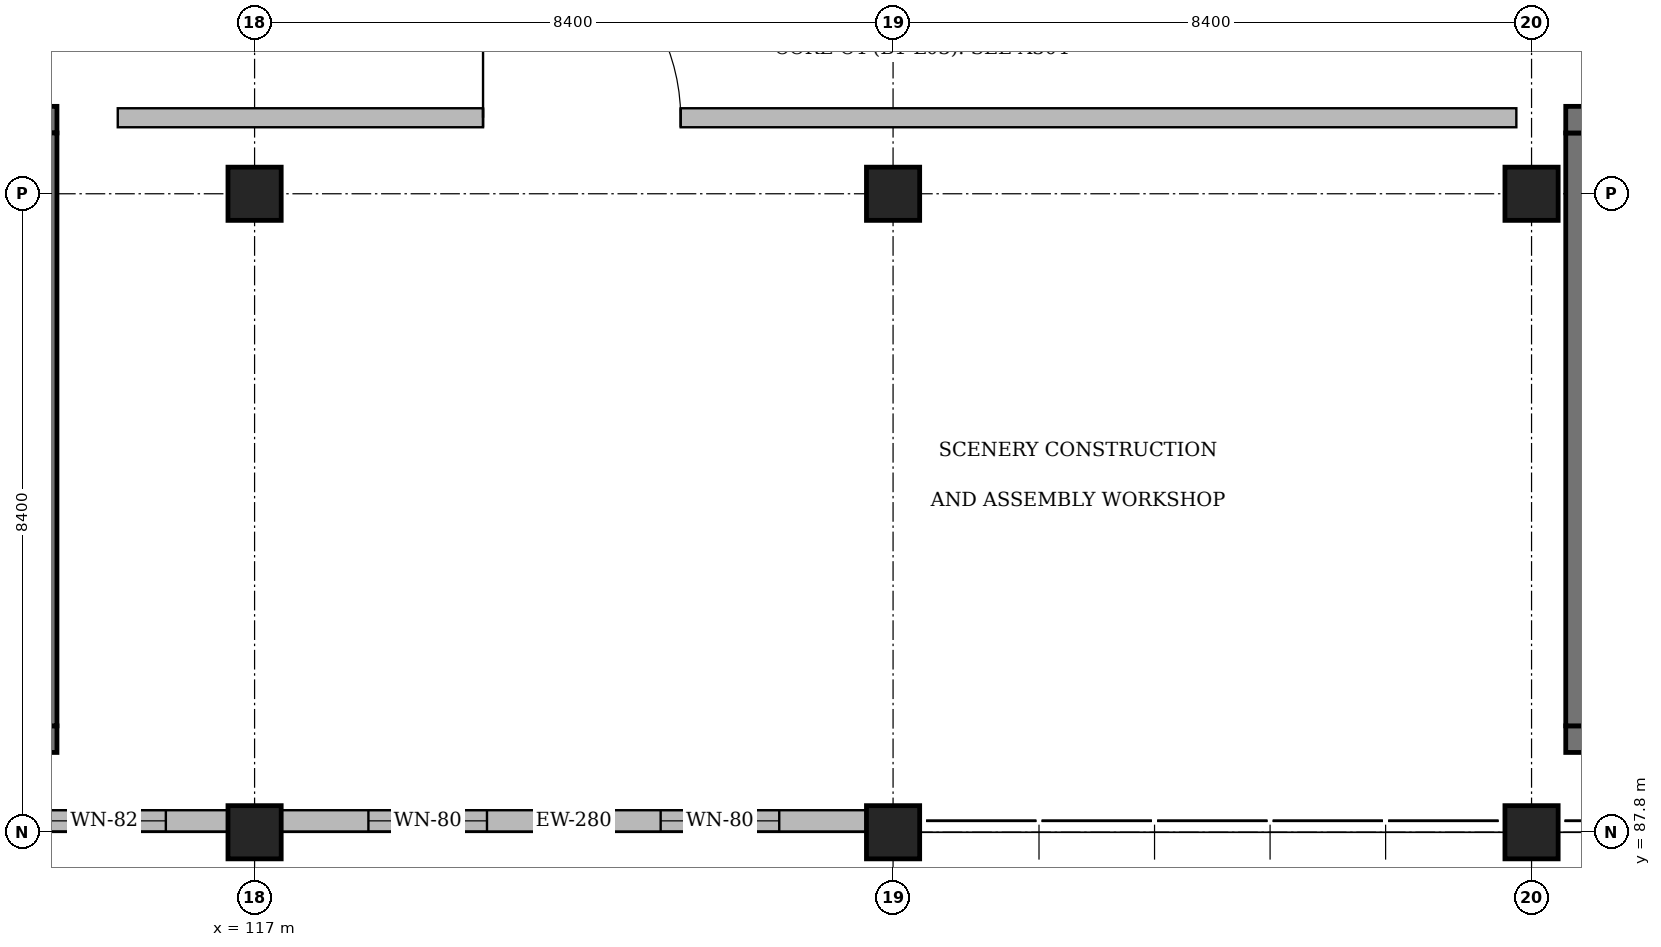
"""IFC4 building model, lengths in metres.
Left out: names, types, materials, properties, quantities, classifications, styles, units other than length and angle.
Written with IfcOpenShell. Run it as: python <this file> out.ifc"""

import sys

from ifc_helpers import new_model, si_unit, direction, frame, frame_2d, origin, origin_2d, place, context, subcontext, project, spatial, rectangle, extrude, element, fill, save


model = new_model("IFC4")
c1 = context("Model", 3, precision=1e-05, world=origin(), true_north=direction((0.0, 1.0)))
c2 = subcontext(c1, "Body", "Model", "MODEL_VIEW")
j1 = project(units=[si_unit("LENGTHUNIT", "METRE"), si_unit("PLANEANGLEUNIT", "RADIAN")], contexts=[c1])
p1 = place(None, origin())
s1 = spatial("IfcSite", under=j1, at=p1, CompositionType="ELEMENT")
p2 = place(p1, origin())
s2 = spatial("IfcBuilding", under=s1, at=p2, CompositionType="ELEMENT")
p3 = place(p2, origin())
s3 = spatial("IfcBuildingStorey", under=s2, at=p3, CompositionType="ELEMENT", Elevation=0.0)
for number, where, z_axis, x_axis in (
    (1, (117.0, 87.8, 0.0), (0.0, 0.0, 1.0), (1.0, 0.0, 0.0)),
    (2, (117.0, 96.2, 0.0), (0.0, 0.0, 1.0), (1.0, 0.0, 0.0)),
    (3, (125.4, 87.8, 0.0), (0.0, 0.0, 1.0), (1.0, 0.0, 0.0)),
    (4, (125.4, 96.2, 0.0), (0.0, 0.0, 1.0), (1.0, 0.0, 0.0)),
    (5, (133.8, 87.8, 0.0), (0.0, 0.0, 1.0), (1.0, 0.0, 0.0)),
    (6, (133.8, 96.2, 0.0), (0.0, 0.0, 1.0), (1.0, 0.0, 0.0)),
):
    element("IfcColumn", number, at=place(p3, frame(where, z_axis=z_axis, x_axis=x_axis)), inside=s3, PredefinedType="COLUMN", context=c2, shape_type="SweptSolid", body=[
        extrude(rectangle(XDim=0.7, YDim=0.7, at=origin_2d()), origin(), (0.0, 0.0, 1.0), 4.8),
    ])
p4 = place(p3, frame((114.4, 89.025, 0.0), z_axis=(0.0, 0.0, 1.0), x_axis=(-1.0, 0.0, 0.0)))
e7 = element("IfcWall", 7, at=p4, inside=s3, PredefinedType="SOLIDWALL", context=c2, shape_type="SweptSolid", body=[
    extrude(rectangle(XDim=4.15, YDim=0.35, at=frame_2d((2.075, 0.0))), origin(), (0.0, 0.0, 1.0), 4.8),
])
p5 = place(p3, frame((110.25, 97.175, 0.0), z_axis=(0.0, 0.0, 1.0), x_axis=(1.0, 0.0, 0.0)))
e8 = element("IfcWall", 8, at=p5, inside=s3, PredefinedType="SOLIDWALL", context=c2, shape_type="SweptSolid", body=[
    extrude(rectangle(XDim=4.15, YDim=0.35, at=frame_2d((2.075, 0.0))), origin(), (0.0, 0.0, 1.0), 4.8),
])
p6 = place(p5, frame((1.525, 0.0, 0.0)))
e9 = element("IfcOpeningElement", 9, at=p6, cuts=e8, PredefinedType="OPENING", context=c2, shape_type="SweptSolid", body=[
    extrude(rectangle(XDim=1.1, YDim=2.15, at=frame_2d((0.55, 1.075))), frame((0.0, 0.195, 0.0), z_axis=(0.0, -1.0, 0.0), x_axis=(1.0, 0.0, 0.0)), (0.0, 0.0, 1.0), 0.39),
])
p7 = place(p3, frame((114.225, 97.0, 0.0), z_axis=(0.0, 0.0, 1.0), x_axis=(0.0, -1.0, 0.0)))
e10 = element("IfcWall", 10, at=p7, inside=s3, PredefinedType="SOLIDWALL", context=c2, shape_type="SweptSolid", body=[
    extrude(rectangle(XDim=7.8, YDim=0.35, at=frame_2d((3.9, 0.0))), origin(), (0.0, 0.0, 1.0), 4.8),
])
p8 = place(p3, frame((138.4, 89.025, 0.0), z_axis=(0.0, 0.0, 1.0), x_axis=(-1.0, 0.0, 0.0)))
e11 = element("IfcWall", 11, at=p8, inside=s3, PredefinedType="SOLIDWALL", context=c2, shape_type="SweptSolid", body=[
    extrude(rectangle(XDim=4.15, YDim=0.35, at=frame_2d((2.075, 0.0))), origin(), (0.0, 0.0, 1.0), 4.56),
])
p9 = place(p3, frame((134.425, 89.2, 0.0), z_axis=(0.0, 0.0, 1.0), x_axis=(0.0, 1.0, 0.0)))
e12 = element("IfcWall", 12, at=p9, inside=s3, PredefinedType="SOLIDWALL", context=c2, shape_type="SweptSolid", body=[
    extrude(rectangle(XDim=7.8, YDim=0.35, at=frame_2d((3.9, 0.0))), origin(), (0.0, 0.0, 1.0), 4.56),
])
p10 = place(p3, frame((134.25, 97.175, 0.0), z_axis=(0.0, 0.0, 1.0), x_axis=(1.0, 0.0, 0.0)))
e13 = element("IfcWall", 13, at=p10, inside=s3, PredefinedType="SOLIDWALL", context=c2, shape_type="SweptSolid", body=[
    extrude(rectangle(XDim=4.15, YDim=0.35, at=frame_2d((2.075, 0.0))), origin(), (0.0, 0.0, 1.0), 4.56),
])
p11 = place(p10, frame((1.525, 0.0, 0.0)))
e14 = element("IfcOpeningElement", 14, at=p11, cuts=e13, PredefinedType="OPENING", context=c2, shape_type="SweptSolid", body=[
    extrude(rectangle(XDim=1.1, YDim=2.15, at=frame_2d((0.55, 1.075))), frame((0.0, 0.195, 0.0), z_axis=(0.0, -1.0, 0.0), x_axis=(1.0, 0.0, 0.0)), (0.0, 0.0, 1.0), 0.39),
])
p12 = place(p3, frame((110.155, 87.95, 0.0), z_axis=(0.0, 0.0, 1.0), x_axis=(1.0, 0.0, 0.0)))
e15 = element("IfcWall", 15, at=p12, inside=s3, PredefinedType="SOLIDWALL", context=c2, shape_type="SweptSolid", body=[
    extrude(rectangle(XDim=6.49, YDim=0.28, at=frame_2d((3.245, 0.0))), origin(), (0.0, 0.0, 1.0), 3.873),
])
p13 = place(p12, frame((0.812, 0.0, 0.95)))
e16 = element("IfcOpeningElement", 16, at=p13, cuts=e15, PredefinedType="OPENING", context=c2, shape_type="SweptSolid", body=[
    extrude(rectangle(XDim=1.62, YDim=2.0, at=frame_2d((0.81, 1.0))), frame((0.0, 0.16, 0.0), z_axis=(0.0, -1.0, 0.0), x_axis=(1.0, 0.0, 0.0)), (0.0, 0.0, 1.0), 0.32),
])
p14 = place(p12, frame((4.058, 0.0, 0.95)))
e17 = element("IfcOpeningElement", 17, at=p14, cuts=e15, PredefinedType="OPENING", context=c2, shape_type="SweptSolid", body=[
    extrude(rectangle(XDim=1.62, YDim=2.0, at=frame_2d((0.81, 1.0))), frame((0.0, 0.16, 0.0), z_axis=(0.0, -1.0, 0.0), x_axis=(1.0, 0.0, 0.0)), (0.0, 0.0, 1.0), 0.32),
])
p15 = place(p3, frame((117.355, 87.95, 0.0), z_axis=(0.0, 0.0, 1.0), x_axis=(1.0, 0.0, 0.0)))
e18 = element("IfcWall", 18, at=p15, inside=s3, PredefinedType="SOLIDWALL", context=c2, shape_type="SweptSolid", body=[
    extrude(rectangle(XDim=7.69, YDim=0.28, at=frame_2d((3.845, 0.0))), origin(), (0.0, 0.0, 1.0), 3.873),
])
p16 = place(p15, frame((1.143, 0.0, 0.95)))
e19 = element("IfcOpeningElement", 19, at=p16, cuts=e18, PredefinedType="OPENING", context=c2, shape_type="SweptSolid", body=[
    extrude(rectangle(XDim=1.56, YDim=2.0, at=frame_2d((0.78, 1.0))), frame((0.0, 0.16, 0.0), z_axis=(0.0, -1.0, 0.0), x_axis=(1.0, 0.0, 0.0)), (0.0, 0.0, 1.0), 0.32),
])
p17 = place(p15, frame((4.988, 0.0, 0.95)))
e20 = element("IfcOpeningElement", 20, at=p17, cuts=e18, PredefinedType="OPENING", context=c2, shape_type="SweptSolid", body=[
    extrude(rectangle(XDim=1.56, YDim=2.0, at=frame_2d((0.78, 1.0))), frame((0.0, 0.16, 0.0), z_axis=(0.0, -1.0, 0.0), x_axis=(1.0, 0.0, 0.0)), (0.0, 0.0, 1.0), 0.32),
])
p18 = place(p3, frame((115.2, 97.2, 0.0), z_axis=(0.0, 0.0, 1.0), x_axis=(1.0, 0.0, 0.0)))
e21 = element("IfcWall", 21, at=p18, inside=s3, PredefinedType="PARTITIONING", context=c2, shape_type="SweptSolid", body=[
    extrude(rectangle(XDim=18.4, YDim=0.25, at=frame_2d((9.2, 0.0))), origin(), (0.0, 0.0, 1.0), 4.54),
])
p19 = place(p18, frame((4.806, 0.0, 0.0)))
e22 = element("IfcOpeningElement", 22, at=p19, cuts=e21, PredefinedType="OPENING", context=c2, shape_type="SweptSolid", body=[
    extrude(rectangle(XDim=2.6, YDim=3.2, at=frame_2d((1.3, 1.6))), frame((0.0, 0.145, 0.0), z_axis=(0.0, -1.0, 0.0), x_axis=(1.0, 0.0, 0.0)), (0.0, 0.0, 1.0), 0.29),
])
p20 = place(p14, origin())
e23 = element("IfcWindow", 23, at=p20, inside=s3, PartitioningType="SINGLE_PANEL", PredefinedType="WINDOW", context=c2, shape_type="SweptSolid", body=[
    extrude(rectangle(XDim=1.62, YDim=2.0, at=frame_2d((0.81, 1.0))), frame((0.0, 0.03, 0.0), z_axis=(0.0, -1.0, 0.0), x_axis=(1.0, 0.0, 0.0)), (0.0, 0.0, 1.0), 0.06),
])
fill(e17, e23)
p21 = place(p16, origin())
e24 = element("IfcWindow", 24, at=p21, inside=s3, PartitioningType="SINGLE_PANEL", PredefinedType="WINDOW", context=c2, shape_type="SweptSolid", body=[
    extrude(rectangle(XDim=1.56, YDim=2.0, at=frame_2d((0.78, 1.0))), frame((0.0, 0.03, 0.0), z_axis=(0.0, -1.0, 0.0), x_axis=(1.0, 0.0, 0.0)), (0.0, 0.0, 1.0), 0.06),
])
fill(e19, e24)
p22 = place(p17, origin())
e25 = element("IfcWindow", 25, at=p22, inside=s3, PartitioningType="SINGLE_PANEL", PredefinedType="WINDOW", context=c2, shape_type="SweptSolid", body=[
    extrude(rectangle(XDim=1.56, YDim=2.0, at=frame_2d((0.78, 1.0))), frame((0.0, 0.03, 0.0), z_axis=(0.0, -1.0, 0.0), x_axis=(1.0, 0.0, 0.0)), (0.0, 0.0, 1.0), 0.06),
])
fill(e20, e25)
p23 = place(p19, origin())
e26 = element("IfcDoor", 26, at=p23, inside=s3, OperationType="DOUBLE_DOOR_SINGLE_SWING", PredefinedType="DOOR", context=c2, shape_type="SweptSolid", body=[
    extrude(rectangle(XDim=2.6, YDim=3.2, at=frame_2d((1.3, 1.6))), frame((0.0, 0.025, 0.0), z_axis=(0.0, -1.0, 0.0), x_axis=(1.0, 0.0, 0.0)), (0.0, 0.0, 1.0), 0.05),
])
fill(e22, e26)
save(model, sys.argv[1])
